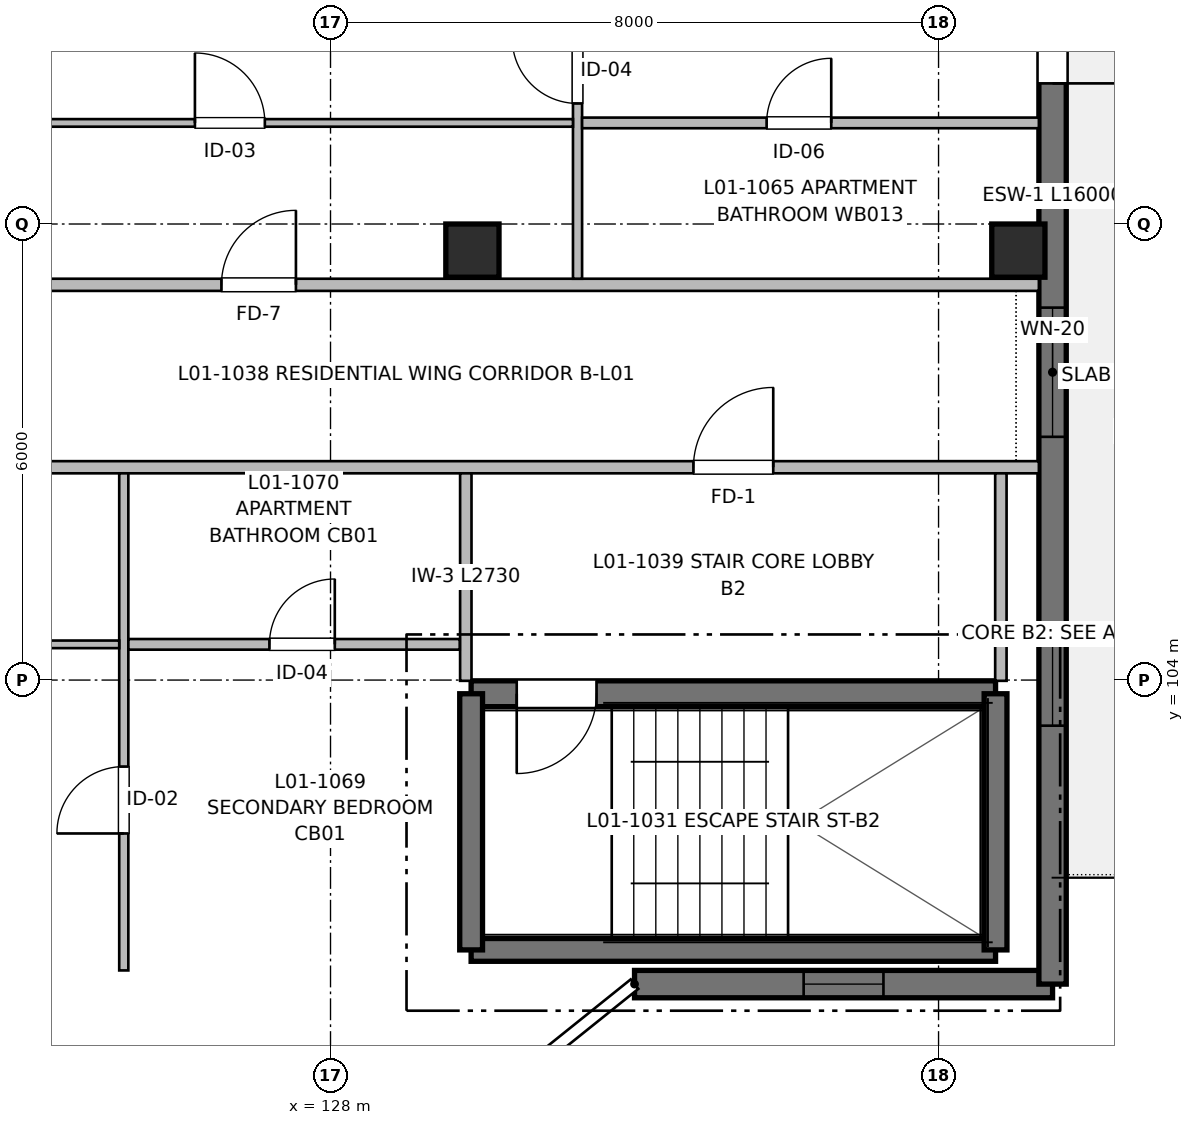
"""IFC4 building model, lengths in metres.
Left out: names, types, materials, properties, quantities, classifications, styles, units other than length and angle.
Written with IfcOpenShell. Run it as: python <this file> out.ifc"""

import sys

from ifc_helpers import new_model, si_unit, direction, frame, frame_2d, origin, origin_2d, place, context, subcontext, project, spatial, rectangle, extrude, element, fill, save


model = new_model("IFC4")
c1 = context("Model", 3, precision=1e-05, world=origin(), true_north=direction((0.0, 1.0)))
c2 = subcontext(c1, "Body", "Model", "MODEL_VIEW")
j1 = project(units=[si_unit("LENGTHUNIT", "METRE"), si_unit("PLANEANGLEUNIT", "RADIAN")], contexts=[c1])
p1 = place(None, origin())
s1 = spatial("IfcSite", under=j1, at=p1, CompositionType="ELEMENT")
p2 = place(p1, origin())
s2 = spatial("IfcBuilding", under=s1, at=p2, CompositionType="ELEMENT")
p3 = place(p2, frame((0.0, 0.0, 4.16)))
s3 = spatial("IfcBuildingStorey", under=s2, at=p3, CompositionType="ELEMENT", Elevation=4.16)
for number, where, z_axis, x_axis in (
    (1, (129.867, 109.65, 0.0), (0.0, 0.0, 1.0), (1.0, 0.0, 0.0)),
    (2, (137.05, 109.65, 0.0), (0.0, 0.0, 1.0), (1.0, 0.0, 0.0)),
):
    element("IfcColumn", number, at=place(p3, frame(where, z_axis=z_axis, x_axis=x_axis)), inside=s3, PredefinedType="COLUMN", context=c2, shape_type="SweptSolid", body=[
        extrude(rectangle(XDim=0.7, YDim=0.7, at=origin_2d()), origin(), (0.0, 0.0, 1.0), 3.2),
    ])
p4 = place(p3, frame((129.85, 100.45, 0.0), z_axis=(0.0, 0.0, 1.0), x_axis=(1.0, 0.0, 0.0)))
e3 = element("IfcWall", 3, at=p4, inside=s3, PredefinedType="SHEAR", context=c2, shape_type="SweptSolid", body=[
    extrude(rectangle(XDim=6.9, YDim=0.3, at=frame_2d((3.45, 0.0))), origin(), (0.0, 0.0, 1.0), 3.2),
])
p5 = place(p3, frame((136.75, 103.82, 0.0), z_axis=(0.0, 0.0, 1.0), x_axis=(-1.0, 0.0, 0.0)))
e4 = element("IfcWall", 4, at=p5, inside=s3, PredefinedType="SHEAR", context=c2, shape_type="SweptSolid", body=[
    extrude(rectangle(XDim=6.9, YDim=0.34, at=frame_2d((3.45, 0.0))), origin(), (0.0, 0.0, 1.0), 3.2),
])
p6 = place(p5, frame((5.25, 0.0, 0.0)))
e5 = element("IfcOpeningElement", 5, at=p6, cuts=e4, PredefinedType="OPENING", context=c2, shape_type="SweptSolid", body=[
    extrude(rectangle(XDim=1.05, YDim=2.15, at=frame_2d((0.525, 1.075))), frame((0.0, 0.18, 0.0), z_axis=(0.0, -1.0, 0.0), x_axis=(1.0, 0.0, 0.0)), (0.0, 0.0, 1.0), 0.36),
])
for number, where, z_axis, x_axis in (
    (6, (129.85, 103.82, 0.0), (0.0, 0.0, 1.0), (0.0, -1.0, 0.0)),
    (7, (136.75, 100.45, 0.0), (0.0, 0.0, 1.0), (0.0, 1.0, 0.0)),
):
    element("IfcWall", number, at=place(p3, frame(where, z_axis=z_axis, x_axis=x_axis)), inside=s3, PredefinedType="SHEAR", context=c2, shape_type="SweptSolid", body=[
        extrude(rectangle(XDim=3.37, YDim=0.3, at=frame_2d((1.685, 0.0))), origin(), (0.0, 0.0, 1.0), 3.2),
    ])
p7 = place(p3, frame((137.5, 100.0, 0.0), z_axis=(0.0, 0.0, 1.0), x_axis=(-1.0, 0.0, 0.0)))
e8 = element("IfcWall", 8, at=p7, inside=s3, PredefinedType="SHEAR", context=c2, shape_type="SweptSolid", body=[
    extrude(rectangle(XDim=5.5, YDim=0.36, at=frame_2d((2.75, 0.0))), origin(), (0.0, 0.0, 1.0), 2.98),
])
p8 = place(p7, frame((2.225, 0.0, 0.9)))
e9 = element("IfcOpeningElement", 9, at=p8, cuts=e8, PredefinedType="OPENING", context=c2, shape_type="SweptSolid", body=[
    extrude(rectangle(XDim=1.05, YDim=1.15, at=frame_2d((0.525, 0.575))), frame((0.0, 0.19, 0.0), z_axis=(0.0, -1.0, 0.0), x_axis=(1.0, 0.0, 0.0)), (0.0, 0.0, 1.0), 0.38),
])
p9 = place(p3, frame((137.5, 116.0, 0.0), z_axis=(0.0, 0.0, 1.0), x_axis=(0.0, -1.0, 0.0)))
e10 = element("IfcWall", 10, at=p9, inside=s3, PredefinedType="SHEAR", context=c2, shape_type="SweptSolid", body=[
    extrude(rectangle(XDim=16.0, YDim=0.36, at=frame_2d((8.0, 0.0))), origin(), (0.0, 0.0, 1.0), 2.98),
])
p10 = place(p9, frame((2.95, 0.0, 0.0)))
e11 = element("IfcOpeningElement", 11, at=p10, cuts=e10, PredefinedType="OPENING", context=c2, shape_type="SweptSolid", body=[
    extrude(rectangle(XDim=1.2, YDim=2.2, at=frame_2d((0.6, 1.1))), frame((0.0, 0.19, 0.0), z_axis=(0.0, -1.0, 0.0), x_axis=(1.0, 0.0, 0.0)), (0.0, 0.0, 1.0), 0.38),
])
p11 = place(p9, frame((7.1, 0.0, 0.72)))
e12 = element("IfcOpeningElement", 12, at=p11, cuts=e10, PredefinedType="OPENING", context=c2, shape_type="SweptSolid", body=[
    extrude(rectangle(XDim=1.7, YDim=1.5, at=frame_2d((0.85, 0.75))), frame((0.0, 0.19, 0.0), z_axis=(0.0, -1.0, 0.0), x_axis=(1.0, 0.0, 0.0)), (0.0, 0.0, 1.0), 0.38),
])
p12 = place(p9, frame((11.4, 0.0, 0.9)))
e13 = element("IfcOpeningElement", 13, at=p12, cuts=e10, PredefinedType="OPENING", context=c2, shape_type="SweptSolid", body=[
    extrude(rectangle(XDim=1.2, YDim=1.05, at=frame_2d((0.6, 0.525))), frame((0.0, 0.19, 0.0), z_axis=(0.0, -1.0, 0.0), x_axis=(1.0, 0.0, 0.0)), (0.0, 0.0, 1.0), 0.38),
])
p13 = place(p3, frame((113.2, 106.8, 0.0), z_axis=(0.0, 0.0, 1.0), x_axis=(1.0, 0.0, 0.0)))
e14 = element("IfcWall", 14, at=p13, inside=s3, PredefinedType="PARTITIONING", context=c2, shape_type="SweptSolid", body=[
    extrude(rectangle(XDim=24.12, YDim=0.16, at=frame_2d((12.06, 0.0))), origin(), (0.0, 0.0, 1.0), 2.935),
])
p14 = place(p13, frame((19.575, 0.0, 0.0)))
e15 = element("IfcOpeningElement", 15, at=p14, cuts=e14, PredefinedType="OPENING", context=c2, shape_type="SweptSolid", body=[
    extrude(rectangle(XDim=1.05, YDim=2.15, at=frame_2d((0.525, 1.075))), frame((0.0, 0.09, 0.0), z_axis=(0.0, -1.0, 0.0), x_axis=(1.0, 0.0, 0.0)), (0.0, 0.0, 1.0), 0.18),
])
p15 = place(p13, frame((8.995, 0.0, 0.0)))
e16 = element("IfcOpeningElement", 16, at=p15, cuts=e14, PredefinedType="OPENING", context=c2, shape_type="SweptSolid", body=[
    extrude(rectangle(XDim=0.98, YDim=2.15, at=frame_2d((0.49, 1.075))), frame((0.0, 0.09, 0.0), z_axis=(0.0, -1.0, 0.0), x_axis=(1.0, 0.0, 0.0)), (0.0, 0.0, 1.0), 0.18),
])
p16 = place(p3, frame((93.68, 109.2, 0.0), z_axis=(0.0, 0.0, 1.0), x_axis=(1.0, 0.0, 0.0)))
e17 = element("IfcWall", 17, at=p16, inside=s3, PredefinedType="PARTITIONING", context=c2, shape_type="SweptSolid", body=[
    extrude(rectangle(XDim=43.64, YDim=0.16, at=frame_2d((21.82, 0.0))), origin(), (0.0, 0.0, 1.0), 2.935),
])
p17 = place(p16, frame((3.705, 0.0, 0.0)))
e18 = element("IfcOpeningElement", 18, at=p17, cuts=e17, PredefinedType="OPENING", context=c2, shape_type="SweptSolid", body=[
    extrude(rectangle(XDim=0.98, YDim=2.15, at=frame_2d((0.49, 1.075))), frame((0.0, 0.09, 0.0), z_axis=(0.0, -1.0, 0.0), x_axis=(1.0, 0.0, 0.0)), (0.0, 0.0, 1.0), 0.18),
])
p18 = place(p16, frame((18.315, 0.0, 0.0)))
e19 = element("IfcOpeningElement", 19, at=p18, cuts=e17, PredefinedType="OPENING", context=c2, shape_type="SweptSolid", body=[
    extrude(rectangle(XDim=0.98, YDim=2.15, at=frame_2d((0.49, 1.075))), frame((0.0, 0.09, 0.0), z_axis=(0.0, -1.0, 0.0), x_axis=(1.0, 0.0, 0.0)), (0.0, 0.0, 1.0), 0.18),
])
p19 = place(p16, frame((32.885, 0.0, 0.0)))
e20 = element("IfcOpeningElement", 20, at=p19, cuts=e17, PredefinedType="OPENING", context=c2, shape_type="SweptSolid", body=[
    extrude(rectangle(XDim=0.98, YDim=2.15, at=frame_2d((0.49, 1.075))), frame((0.0, 0.09, 0.0), z_axis=(0.0, -1.0, 0.0), x_axis=(1.0, 0.0, 0.0)), (0.0, 0.0, 1.0), 0.18),
])
for number, where, z_axis, x_axis in (
    (21, (129.78, 103.99, 0.0), (0.0, 0.0, 1.0), (0.0, 1.0, 0.0)),
    (22, (136.82, 103.99, 0.0), (0.0, 0.0, 1.0), (0.0, 1.0, 0.0)),
):
    element("IfcWall", number, at=place(p3, frame(where, z_axis=z_axis, x_axis=x_axis)), inside=s3, PredefinedType="PARTITIONING", context=c2, shape_type="SweptSolid", body=[
        extrude(rectangle(XDim=2.73, YDim=0.15, at=frame_2d((1.365, 0.0))), origin(), (0.0, 0.0, 1.0), 2.935),
    ])
p20 = place(p3, frame((131.25, 109.28, 0.0), z_axis=(0.0, 0.0, 1.0), x_axis=(0.0, 1.0, 0.0)))
e23 = element("IfcWall", 23, at=p20, inside=s3, PredefinedType="PARTITIONING", context=c2, shape_type="SweptSolid", body=[
    extrude(rectangle(XDim=6.6, YDim=0.12, at=frame_2d((3.3, 0.0))), origin(), (0.0, 0.0, 1.0), 2.935),
])
p21 = place(p20, frame((2.306, 0.0, 0.0)))
e24 = element("IfcOpeningElement", 24, at=p21, cuts=e23, PredefinedType="OPENING", context=c2, shape_type="SweptSolid", body=[
    extrude(rectangle(XDim=0.86, YDim=2.1, at=frame_2d((0.43, 1.05))), frame((0.0, 0.07, 0.0), z_axis=(0.0, -1.0, 0.0), x_axis=(1.0, 0.0, 0.0)), (0.0, 0.0, 1.0), 0.14),
])
p22 = place(p20, frame((4.097, 0.0, 0.0)))
e25 = element("IfcOpeningElement", 25, at=p22, cuts=e23, PredefinedType="OPENING", context=c2, shape_type="SweptSolid", body=[
    extrude(rectangle(XDim=0.9, YDim=2.1, at=frame_2d((0.45, 1.05))), frame((0.0, 0.07, 0.0), z_axis=(0.0, -1.0, 0.0), x_axis=(1.0, 0.0, 0.0)), (0.0, 0.0, 1.0), 0.14),
])
p23 = place(p3, frame((131.31, 111.33, 0.0), z_axis=(0.0, 0.0, 1.0), x_axis=(1.0, 0.0, 0.0)))
e26 = element("IfcWall", 26, at=p23, inside=s3, PredefinedType="PARTITIONING", context=c2, shape_type="SweptSolid", body=[
    extrude(rectangle(XDim=6.01, YDim=0.14, at=frame_2d((3.005, 0.0))), origin(), (0.0, 0.0, 1.0), 2.935),
])
p24 = place(p23, frame((2.428, 0.0, 0.0)))
e27 = element("IfcOpeningElement", 27, at=p24, cuts=e26, PredefinedType="OPENING", context=c2, shape_type="SweptSolid", body=[
    extrude(rectangle(XDim=0.85, YDim=2.05, at=frame_2d((0.425, 1.025))), frame((0.0, 0.08, 0.0), z_axis=(0.0, -1.0, 0.0), x_axis=(1.0, 0.0, 0.0)), (0.0, 0.0, 1.0), 0.16),
])
p25 = place(p3, frame((122.86, 111.33, 0.0), z_axis=(0.0, 0.0, 1.0), x_axis=(1.0, 0.0, 0.0)))
e28 = element("IfcWall", 28, at=p25, inside=s3, PredefinedType="PARTITIONING", context=c2, shape_type="SweptSolid", body=[
    extrude(rectangle(XDim=8.33, YDim=0.1, at=frame_2d((4.165, 0.0))), origin(), (0.0, 0.0, 1.0), 2.935),
])
p26 = place(p25, frame((3.356, 0.0, 0.0)))
e29 = element("IfcOpeningElement", 29, at=p26, cuts=e28, PredefinedType="OPENING", context=c2, shape_type="SweptSolid", body=[
    extrude(rectangle(XDim=0.92, YDim=2.1, at=frame_2d((0.46, 1.05))), frame((0.0, 0.06, 0.0), z_axis=(0.0, -1.0, 0.0), x_axis=(1.0, 0.0, 0.0)), (0.0, 0.0, 1.0), 0.12),
])
p27 = place(p3, frame((125.28, 100.18, 0.0), z_axis=(0.0, 0.0, 1.0), x_axis=(0.0, 1.0, 0.0)))
e30 = element("IfcWall", 30, at=p27, inside=s3, PredefinedType="PARTITIONING", context=c2, shape_type="SweptSolid", body=[
    extrude(rectangle(XDim=6.54, YDim=0.12, at=frame_2d((3.27, 0.0))), origin(), (0.0, 0.0, 1.0), 2.935),
])
p28 = place(p27, frame((1.802, 0.0, 0.0)))
e31 = element("IfcOpeningElement", 31, at=p28, cuts=e30, PredefinedType="OPENING", context=c2, shape_type="SweptSolid", body=[
    extrude(rectangle(XDim=0.88, YDim=2.1, at=frame_2d((0.44, 1.05))), frame((0.0, 0.07, 0.0), z_axis=(0.0, -1.0, 0.0), x_axis=(1.0, 0.0, 0.0)), (0.0, 0.0, 1.0), 0.14),
])
p29 = place(p3, frame((125.34, 104.47, 0.0), z_axis=(0.0, 0.0, 1.0), x_axis=(1.0, 0.0, 0.0)))
e32 = element("IfcWall", 32, at=p29, inside=s3, PredefinedType="PARTITIONING", context=c2, shape_type="SweptSolid", body=[
    extrude(rectangle(XDim=4.36, YDim=0.14, at=frame_2d((2.18, 0.0))), origin(), (0.0, 0.0, 1.0), 2.935),
])
p30 = place(p29, frame((1.856, 0.0, 0.0)))
e33 = element("IfcOpeningElement", 33, at=p30, cuts=e32, PredefinedType="OPENING", context=c2, shape_type="SweptSolid", body=[
    extrude(rectangle(XDim=0.86, YDim=2.1, at=frame_2d((0.43, 1.05))), frame((0.0, 0.08, 0.0), z_axis=(0.0, -1.0, 0.0), x_axis=(1.0, 0.0, 0.0)), (0.0, 0.0, 1.0), 0.16),
])
p31 = place(p3, frame((120.09, 104.47, 0.0), z_axis=(0.0, 0.0, 1.0), x_axis=(1.0, 0.0, 0.0)))
e34 = element("IfcWall", 34, at=p31, inside=s3, PredefinedType="PARTITIONING", context=c2, shape_type="SweptSolid", body=[
    extrude(rectangle(XDim=5.13, YDim=0.1, at=frame_2d((2.565, 0.0))), origin(), (0.0, 0.0, 1.0), 2.935),
])
p32 = place(p31, frame((2.18, 0.0, 0.0)))
e35 = element("IfcOpeningElement", 35, at=p32, cuts=e34, PredefinedType="OPENING", context=c2, shape_type="SweptSolid", body=[
    extrude(rectangle(XDim=0.92, YDim=2.1, at=frame_2d((0.46, 1.05))), frame((0.0, 0.06, 0.0), z_axis=(0.0, -1.0, 0.0), x_axis=(1.0, 0.0, 0.0)), (0.0, 0.0, 1.0), 0.12),
])
p33 = place(p6, origin())
e36 = element("IfcDoor", 36, at=p33, inside=s3, OperationType="SINGLE_SWING_RIGHT", PredefinedType="DOOR", context=c2, shape_type="SweptSolid", body=[
    extrude(rectangle(XDim=1.05, YDim=2.15, at=frame_2d((0.525, 1.075))), frame((0.0, 0.025, 0.0), z_axis=(0.0, -1.0, 0.0), x_axis=(1.0, 0.0, 0.0)), (0.0, 0.0, 1.0), 0.05),
])
fill(e5, e36)
p34 = place(p8, origin())
e37 = element("IfcWindow", 37, at=p34, inside=s3, PartitioningType="SINGLE_PANEL", PredefinedType="WINDOW", context=c2, shape_type="SweptSolid", body=[
    extrude(rectangle(XDim=1.05, YDim=1.15, at=frame_2d((0.525, 0.575))), frame((0.0, 0.03, 0.0), z_axis=(0.0, -1.0, 0.0), x_axis=(1.0, 0.0, 0.0)), (0.0, 0.0, 1.0), 0.06),
])
fill(e9, e37)
p35 = place(p10, origin())
e38 = element("IfcDoor", 38, at=p35, inside=s3, OperationType="SINGLE_SWING_RIGHT", PredefinedType="DOOR", context=c2, shape_type="SweptSolid", body=[
    extrude(rectangle(XDim=1.2, YDim=2.2, at=frame_2d((0.6, 1.1))), frame((0.0, 0.025, 0.0), z_axis=(0.0, -1.0, 0.0), x_axis=(1.0, 0.0, 0.0)), (0.0, 0.0, 1.0), 0.05),
])
fill(e11, e38)
p36 = place(p11, origin())
e39 = element("IfcWindow", 39, at=p36, inside=s3, PartitioningType="SINGLE_PANEL", PredefinedType="WINDOW", context=c2, shape_type="SweptSolid", body=[
    extrude(rectangle(XDim=1.7, YDim=1.5, at=frame_2d((0.85, 0.75))), frame((0.0, 0.03, 0.0), z_axis=(0.0, -1.0, 0.0), x_axis=(1.0, 0.0, 0.0)), (0.0, 0.0, 1.0), 0.06),
])
fill(e12, e39)
p37 = place(p12, origin())
e40 = element("IfcWindow", 40, at=p37, inside=s3, PartitioningType="SINGLE_PANEL", PredefinedType="WINDOW", context=c2, shape_type="SweptSolid", body=[
    extrude(rectangle(XDim=1.2, YDim=1.05, at=frame_2d((0.6, 0.525))), frame((0.0, 0.03, 0.0), z_axis=(0.0, -1.0, 0.0), x_axis=(1.0, 0.0, 0.0)), (0.0, 0.0, 1.0), 0.06),
])
fill(e13, e40)
p38 = place(p14, origin())
e41 = element("IfcDoor", 41, at=p38, inside=s3, OperationType="SINGLE_SWING_RIGHT", PredefinedType="DOOR", context=c2, shape_type="SweptSolid", body=[
    extrude(rectangle(XDim=1.05, YDim=2.15, at=frame_2d((0.525, 1.075))), frame((0.0, 0.025, 0.0), z_axis=(0.0, -1.0, 0.0), x_axis=(1.0, 0.0, 0.0)), (0.0, 0.0, 1.0), 0.05),
])
fill(e15, e41)
p39 = place(p19, origin())
e42 = element("IfcDoor", 42, at=p39, inside=s3, OperationType="SINGLE_SWING_RIGHT", PredefinedType="DOOR", context=c2, shape_type="SweptSolid", body=[
    extrude(rectangle(XDim=0.98, YDim=2.15, at=frame_2d((0.49, 1.075))), frame((0.0, 0.025, 0.0), z_axis=(0.0, -1.0, 0.0), x_axis=(1.0, 0.0, 0.0)), (0.0, 0.0, 1.0), 0.05),
])
fill(e20, e42)
p40 = place(p26, origin())
e43 = element("IfcDoor", 43, at=p40, inside=s3, OperationType="SINGLE_SWING_LEFT", PredefinedType="DOOR", context=c2, shape_type="SweptSolid", body=[
    extrude(rectangle(XDim=0.92, YDim=2.1, at=frame_2d((0.46, 1.05))), frame((0.0, 0.025, 0.0), z_axis=(0.0, -1.0, 0.0), x_axis=(1.0, 0.0, 0.0)), (0.0, 0.0, 1.0), 0.05),
])
fill(e29, e43)
p41 = place(p21, origin())
e44 = element("IfcDoor", 44, at=p41, inside=s3, OperationType="SINGLE_SWING_RIGHT", PredefinedType="DOOR", context=c2, shape_type="SweptSolid", body=[
    extrude(rectangle(XDim=0.86, YDim=2.1, at=frame_2d((0.43, 1.05))), frame((0.0, 0.025, 0.0), z_axis=(0.0, -1.0, 0.0), x_axis=(1.0, 0.0, 0.0)), (0.0, 0.0, 1.0), 0.05),
])
fill(e24, e44)
p42 = place(p24, origin())
e45 = element("IfcDoor", 45, at=p42, inside=s3, OperationType="SINGLE_SWING_RIGHT", PredefinedType="DOOR", context=c2, shape_type="SweptSolid", body=[
    extrude(rectangle(XDim=0.85, YDim=2.05, at=frame_2d((0.425, 1.025))), frame((0.0, 0.025, 0.0), z_axis=(0.0, -1.0, 0.0), x_axis=(1.0, 0.0, 0.0)), (0.0, 0.0, 1.0), 0.05),
])
fill(e27, e45)
p43 = place(p28, origin())
e46 = element("IfcDoor", 46, at=p43, inside=s3, OperationType="SINGLE_SWING_LEFT", PredefinedType="DOOR", context=c2, shape_type="SweptSolid", body=[
    extrude(rectangle(XDim=0.88, YDim=2.1, at=frame_2d((0.44, 1.05))), frame((0.0, 0.025, 0.0), z_axis=(0.0, -1.0, 0.0), x_axis=(1.0, 0.0, 0.0)), (0.0, 0.0, 1.0), 0.05),
])
fill(e31, e46)
p44 = place(p30, origin())
e47 = element("IfcDoor", 47, at=p44, inside=s3, OperationType="SINGLE_SWING_RIGHT", PredefinedType="DOOR", context=c2, shape_type="SweptSolid", body=[
    extrude(rectangle(XDim=0.86, YDim=2.1, at=frame_2d((0.43, 1.05))), frame((0.0, 0.025, 0.0), z_axis=(0.0, -1.0, 0.0), x_axis=(1.0, 0.0, 0.0)), (0.0, 0.0, 1.0), 0.05),
])
fill(e33, e47)
save(model, sys.argv[1])
